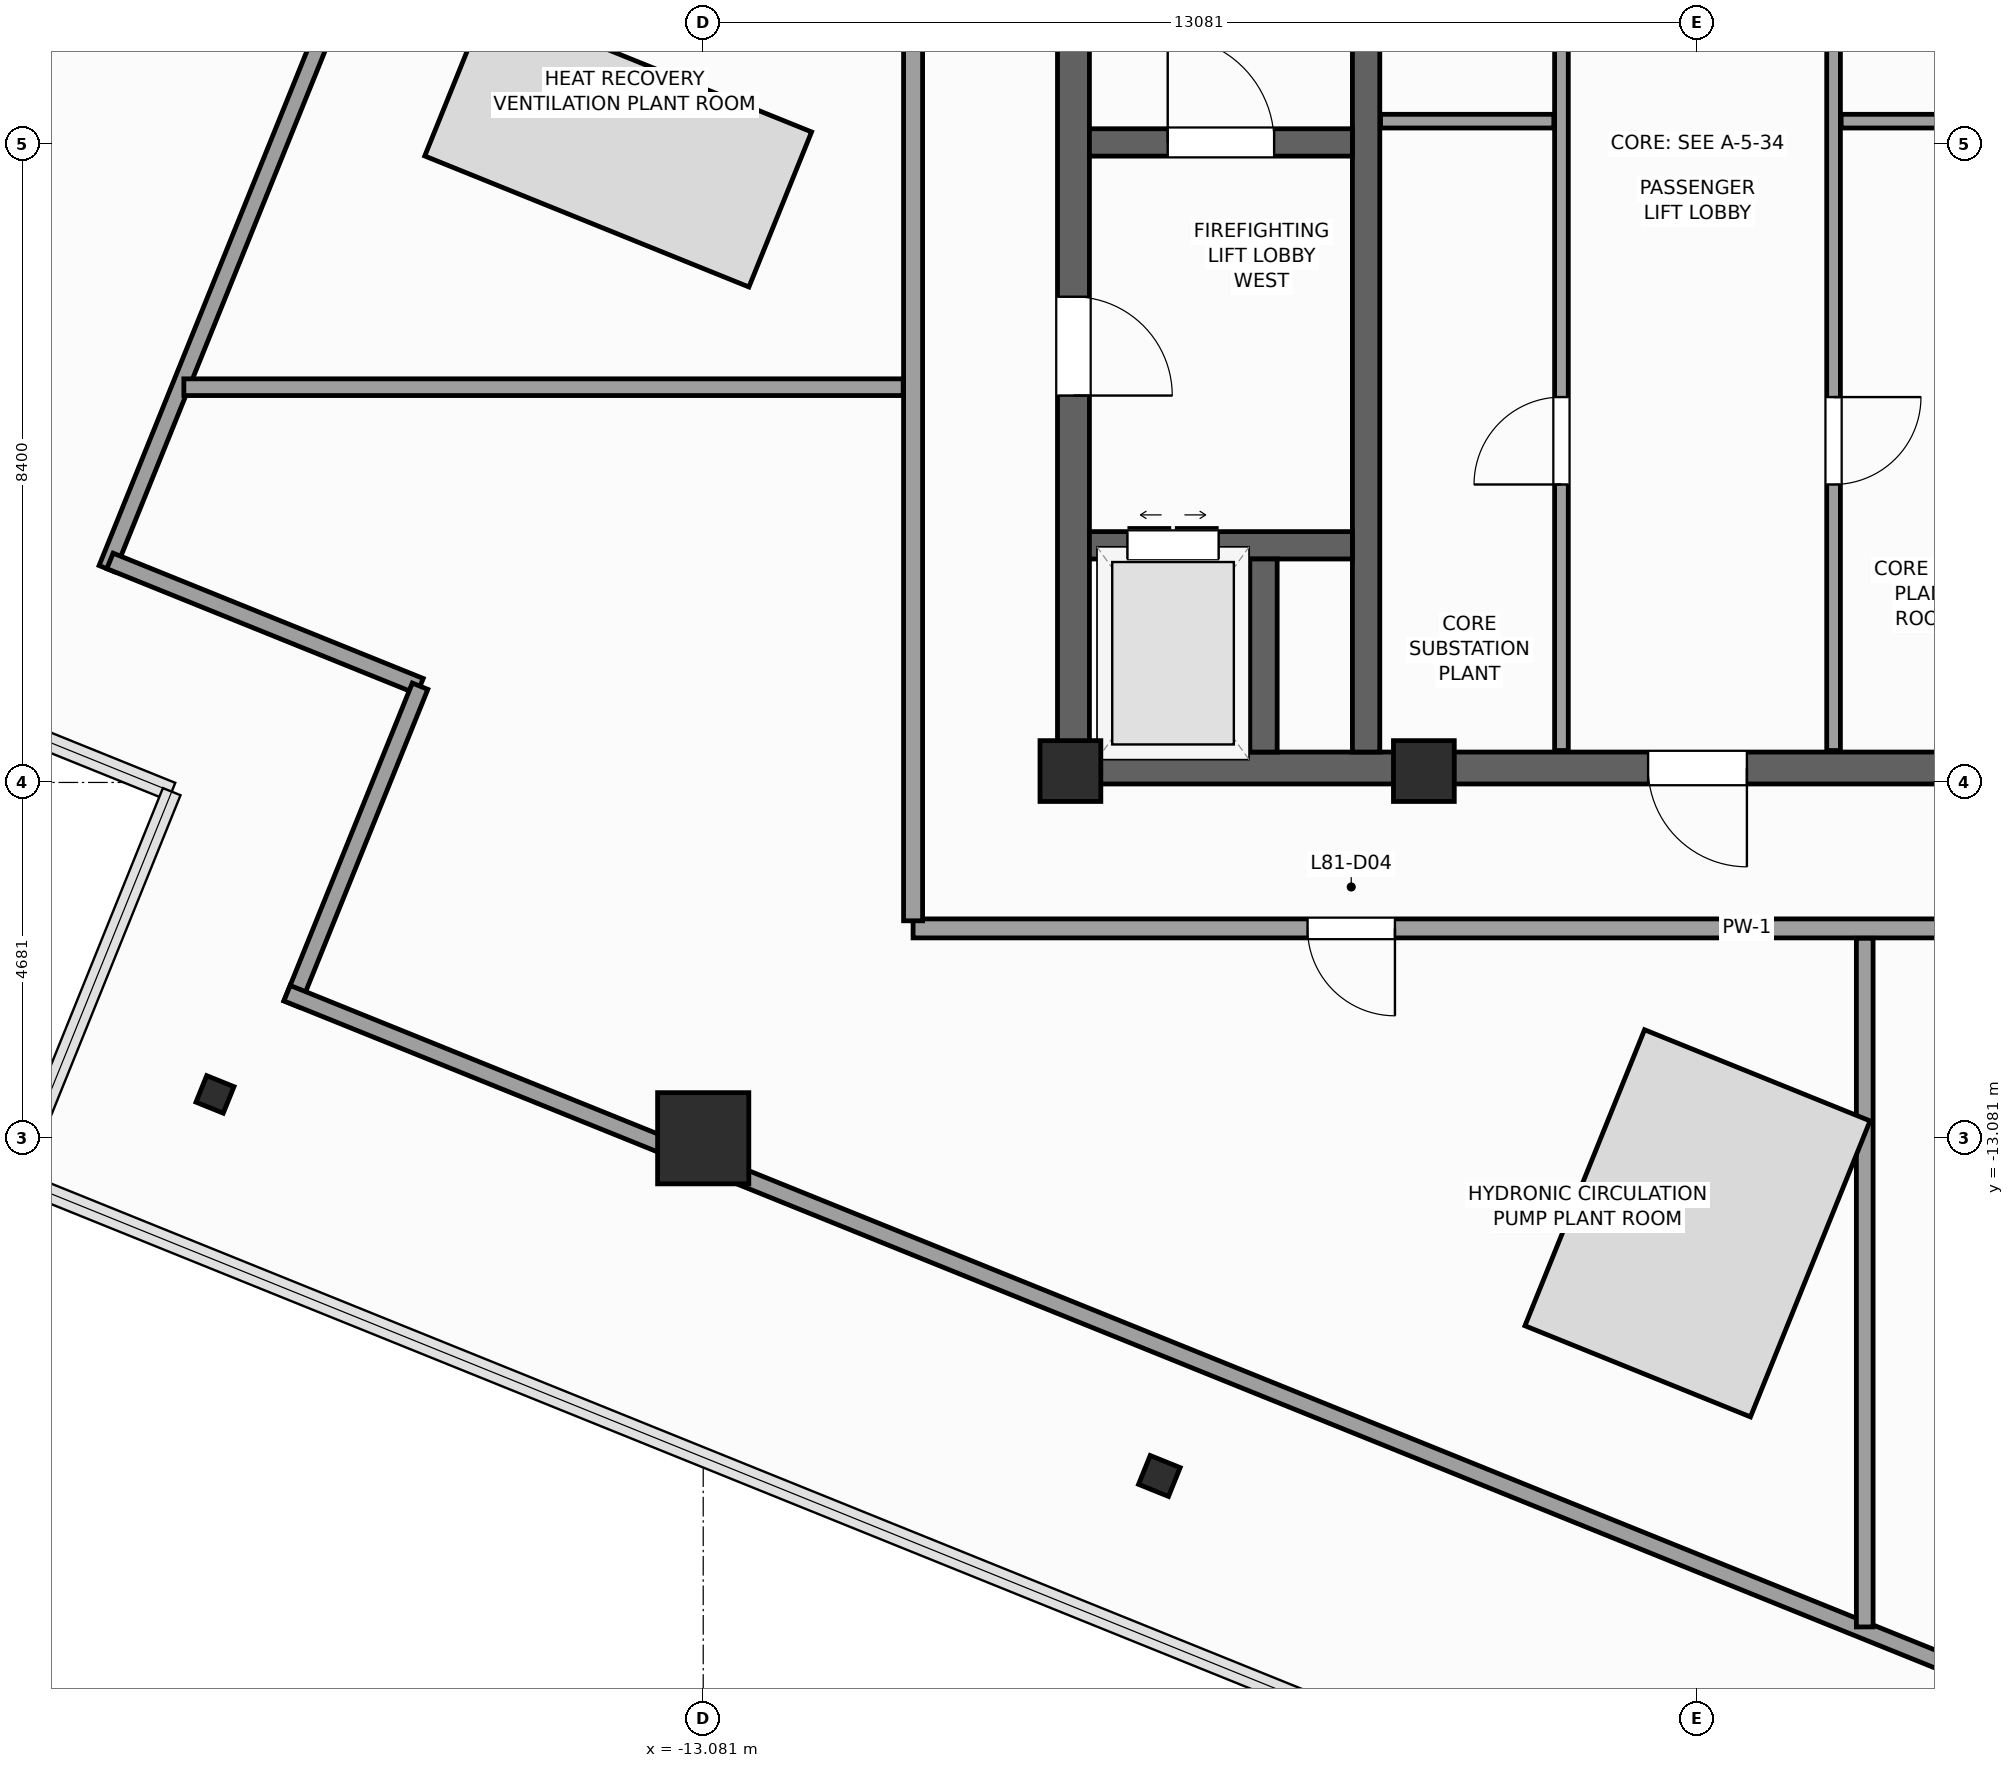
"""IFC4 building model, lengths in metres.
Left out: names, types, materials, properties, quantities, classifications, styles, units other than length and angle.
Written with IfcOpenShell. Run it as: python <this file> out.ifc"""

import sys

from ifc_helpers import new_model, si_unit, direction, frame, frame_2d, origin, origin_2d, place, context, subcontext, project, spatial, rectangle, i_section, extrude, source, transform, mapped, element, fill, save


model = new_model("IFC4")
c1 = context("Model", 3, precision=1e-05, world=origin(), true_north=direction((0.0, 1.0)))
c2 = subcontext(c1, "Body", "Model", "MODEL_VIEW")
j1 = project(units=[si_unit("LENGTHUNIT", "METRE"), si_unit("PLANEANGLEUNIT", "RADIAN")], contexts=[c1])
p1 = place(None, origin())
s1 = spatial("IfcSite", under=j1, at=p1, CompositionType="ELEMENT")
p2 = place(p1, origin())
s2 = spatial("IfcBuilding", under=s1, at=p2, CompositionType="ELEMENT")
p3 = place(p2, frame((0.0, 0.0, 329.6)))
s3 = spatial("IfcBuildingStorey", under=s2, at=p3, CompositionType="ELEMENT", Elevation=329.6)
p4 = place(p3, frame((-8.42, -8.21, 0.0), z_axis=(0.0, 0.0, 1.0), x_axis=(1.0, 0.0, 0.0)))
e1 = element("IfcWall", 1, at=p4, inside=s3, PredefinedType="SHEAR", context=c2, shape_type="SweptSolid", body=[
    extrude(rectangle(XDim=16.84, YDim=0.42, at=frame_2d((8.42, 0.0))), origin(), (0.0, 0.0, 1.0), 4.0),
])
p5 = place(p4, frame((7.77, 0.0, 0.0)))
e2 = element("IfcOpeningElement", 2, at=p5, cuts=e1, PredefinedType="OPENING", context=c2, shape_type="SweptSolid", body=[
    extrude(rectangle(XDim=1.3, YDim=2.2, at=frame_2d((0.65, 1.1))), frame((0.0, 0.22, 0.0), z_axis=(0.0, -1.0, 0.0), x_axis=(1.0, 0.0, 0.0)), (0.0, 0.0, 1.0), 0.44),
])
p6 = place(p3, frame((-8.21, -8.0, 0.0), z_axis=(0.0, 0.0, 1.0), x_axis=(0.0, 1.0, 0.0)))
e3 = element("IfcWall", 3, at=p6, inside=s3, PredefinedType="SHEAR", context=c2, shape_type="SweptSolid", body=[
    extrude(rectangle(XDim=16.0, YDim=0.42, at=frame_2d((8.0, 0.0))), origin(), (0.0, 0.0, 1.0), 4.0),
])
p7 = place(p6, frame((4.69, 0.0, 0.0)))
e4 = element("IfcOpeningElement", 4, at=p7, cuts=e3, PredefinedType="OPENING", context=c2, shape_type="SweptSolid", body=[
    extrude(rectangle(XDim=1.3, YDim=2.2, at=frame_2d((0.65, 1.1))), frame((0.0, 0.22, 0.0), z_axis=(0.0, -1.0, 0.0), x_axis=(1.0, 0.0, 0.0)), (0.0, 0.0, 1.0), 0.44),
])
p8 = place(p3, frame((-4.36, -8.0, 0.0), z_axis=(0.0, 0.0, 1.0), x_axis=(0.0, 1.0, 0.0)))
e5 = element("IfcWall", 5, at=p8, inside=s3, PredefinedType="SHEAR", context=c2, shape_type="SweptSolid", body=[
    extrude(rectangle(XDim=16.0, YDim=0.36, at=frame_2d((8.0, 0.0))), origin(), (0.0, 0.0, 1.0), 4.0),
])
p9 = place(p3, frame((-8.0, 0.02, 0.0), z_axis=(0.0, 0.0, 1.0), x_axis=(1.0, 0.0, 0.0)))
e6 = element("IfcWall", 6, at=p9, inside=s3, PredefinedType="SHEAR", context=c2, shape_type="SweptSolid", body=[
    extrude(rectangle(XDim=3.46, YDim=0.36, at=frame_2d((1.73, 0.0))), origin(), (0.0, 0.0, 1.0), 4.0),
])
p10 = place(p9, frame((1.03, 0.0, 0.0)))
e7 = element("IfcOpeningElement", 7, at=p10, cuts=e6, PredefinedType="OPENING", context=c2, shape_type="SweptSolid", body=[
    extrude(rectangle(XDim=1.4, YDim=2.2, at=frame_2d((0.7, 1.1))), frame((0.0, 0.19, 0.0), z_axis=(0.0, -1.0, 0.0), x_axis=(1.0, 0.0, 0.0)), (0.0, 0.0, 1.0), 0.38),
])
p11 = place(p3, frame((-8.0, -5.28, 0.0), z_axis=(0.0, 0.0, 1.0), x_axis=(1.0, 0.0, 0.0)))
e8 = element("IfcWall", 8, at=p11, inside=s3, PredefinedType="SHEAR", context=c2, shape_type="SweptSolid", body=[
    extrude(rectangle(XDim=3.46, YDim=0.36, at=frame_2d((1.73, 0.0))), origin(), (0.0, 0.0, 1.0), 4.0),
])
p12 = place(p11, frame((0.5, 0.0, 0.0)))
e9 = element("IfcOpeningElement", 9, at=p12, cuts=e8, PredefinedType="OPENING", context=c2, shape_type="SweptSolid", body=[
    extrude(rectangle(XDim=1.2, YDim=2.25, at=frame_2d((0.6, 1.125))), frame((0.0, 0.19, 0.0), z_axis=(0.0, -1.0, 0.0), x_axis=(1.0, 0.0, 0.0)), (0.0, 0.0, 1.0), 0.38),
])
p13 = place(p3, frame((-5.71, -8.0, 0.0), z_axis=(0.0, 0.0, 1.0), x_axis=(0.0, 1.0, 0.0)))
e10 = element("IfcWall", 10, at=p13, inside=s3, PredefinedType="SHEAR", context=c2, shape_type="SweptSolid", body=[
    extrude(rectangle(XDim=2.54, YDim=0.36, at=frame_2d((1.27, 0.0))), origin(), (0.0, 0.0, 1.0), 4.0),
])
m1 = source(origin(), c2, "Body", "SweptSolid", [
    extrude(rectangle(XDim=0.8, YDim=0.8, at=origin_2d()), origin(), (0.0, 0.0, 1.0), 4.0),
])
for number, where, z_axis, x_axis in (
    (11, (-8.25, -8.25, 0.0), (0.0, 0.0, 1.0), (1.0, 0.0, 0.0)),
    (12, (-3.6, -8.25, 0.0), (0.0, 0.0, 1.0), (1.0, 0.0, 0.0)),
):
    element("IfcColumn", number, at=place(p3, frame(where, z_axis=z_axis, x_axis=x_axis)), inside=s3, PredefinedType="PILASTER", context=c2, shape_type="MappedRepresentation", body=[
        mapped(m1, transform((0.0, 0.0, 0.0), scale=1.0)),
    ])
m2 = source(origin(), c2, "Body", "SweptSolid", [
    extrude(rectangle(XDim=1.2, YDim=1.2, at=origin_2d()), origin(), (0.0, 0.0, 1.0), 4.0),
])
p14 = place(p3, frame((-13.081, -13.081, 0.0), z_axis=(0.0, 0.0, 1.0), x_axis=(1.0, 0.0, 0.0)))
e13 = element("IfcColumn", 13, at=p14, inside=s3, PredefinedType="COLUMN", context=c2, shape_type="MappedRepresentation", body=[
    mapped(m2, transform((0.0, 0.0, 0.0), scale=1.0)),
])
m3 = source(origin(), c2, "Body", "SweptSolid", [
    extrude(i_section(OverallWidth=0.376, OverallDepth=0.387, WebThickness=0.02, FlangeThickness=0.032, FilletRadius=0.015, at=origin_2d()), origin(), (0.0, 0.0, 1.0), 4.0),
])
p15 = place(p3, frame((-19.504, -12.504, 0.0), z_axis=(0.0, 0.0, 1.0), x_axis=(0.374606593416, 0.927183854567, 0.0)))
e14 = element("IfcColumn", 14, at=p15, inside=s3, PredefinedType="COLUMN", context=c2, shape_type="MappedRepresentation", body=[
    mapped(m3, transform((0.0, 0.0, 0.0), scale=1.0)),
])
m4 = source(origin(), c2, "Body", "SweptSolid", [
    extrude(i_section(OverallWidth=0.409, OverallDepth=0.425, WebThickness=0.024, FlangeThickness=0.039, FilletRadius=0.015, at=origin_2d()), origin(), (0.0, 0.0, 1.0), 4.0),
])
p16 = place(p3, frame((-7.08, -17.524, 0.0), z_axis=(0.0, 0.0, 1.0), x_axis=(0.374606593416, 0.927183854567, 0.0)))
e15 = element("IfcColumn", 15, at=p16, inside=s3, PredefinedType="COLUMN", context=c2, shape_type="MappedRepresentation", body=[
    mapped(m4, transform((0.0, 0.0, 0.0), scale=1.0)),
])
p17 = place(p3, frame((-1.79, -7.98, 0.0), z_axis=(0.0, 0.0, 1.0), x_axis=(0.0, 1.0, 0.0)))
e16 = element("IfcWall", 16, at=p17, inside=s3, PredefinedType="PARTITIONING", context=c2, shape_type="SweptSolid", body=[
    extrude(rectangle(XDim=12.38, YDim=0.18, at=frame_2d((6.19, 0.0))), origin(), (0.0, 0.0, 1.0), 3.7),
])
p18 = place(p17, frame((3.5, 0.0, 0.0)))
e17 = element("IfcOpeningElement", 17, at=p18, cuts=e16, PredefinedType="OPENING", context=c2, shape_type="SweptSolid", body=[
    extrude(rectangle(XDim=1.15, YDim=2.25, at=frame_2d((0.575, 1.125))), frame((0.0, 0.1, 0.0), z_axis=(0.0, -1.0, 0.0), x_axis=(1.0, 0.0, 0.0)), (0.0, 0.0, 1.0), 0.2),
])
p19 = place(p17, frame((9.8, 0.0, 0.0)))
e18 = element("IfcOpeningElement", 18, at=p19, cuts=e16, PredefinedType="OPENING", context=c2, shape_type="SweptSolid", body=[
    extrude(rectangle(XDim=1.15, YDim=2.25, at=frame_2d((0.575, 1.125))), frame((0.0, 0.1, 0.0), z_axis=(0.0, -1.0, 0.0), x_axis=(1.0, 0.0, 0.0)), (0.0, 0.0, 1.0), 0.2),
])
p20 = place(p3, frame((1.79, -7.98, 0.0), z_axis=(0.0, 0.0, 1.0), x_axis=(0.0, 1.0, 0.0)))
e19 = element("IfcWall", 19, at=p20, inside=s3, PredefinedType="PARTITIONING", context=c2, shape_type="SweptSolid", body=[
    extrude(rectangle(XDim=12.38, YDim=0.18, at=frame_2d((6.19, 0.0))), origin(), (0.0, 0.0, 1.0), 3.7),
])
p21 = place(p20, frame((3.5, 0.0, 0.0)))
e20 = element("IfcOpeningElement", 20, at=p21, cuts=e19, PredefinedType="OPENING", context=c2, shape_type="SweptSolid", body=[
    extrude(rectangle(XDim=1.15, YDim=2.25, at=frame_2d((0.575, 1.125))), frame((0.0, 0.1, 0.0), z_axis=(0.0, -1.0, 0.0), x_axis=(1.0, 0.0, 0.0)), (0.0, 0.0, 1.0), 0.2),
])
p22 = place(p20, frame((9.8, 0.0, 0.0)))
e21 = element("IfcOpeningElement", 21, at=p22, cuts=e19, PredefinedType="OPENING", context=c2, shape_type="SweptSolid", body=[
    extrude(rectangle(XDim=1.15, YDim=2.25, at=frame_2d((0.575, 1.125))), frame((0.0, 0.1, 0.0), z_axis=(0.0, -1.0, 0.0), x_axis=(1.0, 0.0, 0.0)), (0.0, 0.0, 1.0), 0.2),
])
for number, where, z_axis, x_axis in (
    (22, (-4.17, 0.3, 0.0), (0.0, 0.0, 1.0), (1.0, 0.0, 0.0)),
    (23, (1.89, 0.3, 0.0), (0.0, 0.0, 1.0), (1.0, 0.0, 0.0)),
):
    element("IfcWall", number, at=place(p3, frame(where, z_axis=z_axis, x_axis=x_axis)), inside=s3, PredefinedType="PARTITIONING", context=c2, shape_type="SweptSolid", body=[
        extrude(rectangle(XDim=2.28, YDim=0.18, at=frame_2d((1.14, 0.0))), origin(), (0.0, 0.0, 1.0), 3.7),
    ])
p23 = place(p3, frame((-11.172, 18.556, 0.0), z_axis=(0.0, 0.0, 1.0), x_axis=(-0.374611707018, -0.927181788521, 0.0)))
e24 = element("IfcWall", 24, at=p23, inside=s3, PredefinedType="PARTITIONING", context=c2, shape_type="SweptSolid", body=[
    extrude(rectangle(XDim=26.04, YDim=0.22, at=frame_2d((13.02, 0.0))), origin(), (0.0, 0.0, 1.0), 3.05),
])
p24 = place(p3, frame((-20.886, -5.486, 0.0), z_axis=(0.0, 0.0, 1.0), x_axis=(0.927189216671, -0.374593321469, 0.0)))
e25 = element("IfcWall", 25, at=p24, inside=s3, PredefinedType="PARTITIONING", context=c2, shape_type="SweptSolid", body=[
    extrude(rectangle(XDim=4.4, YDim=0.22, at=frame_2d((2.2, 0.0))), origin(), (0.0, 0.0, 1.0), 3.7),
])
p25 = place(p3, frame((-16.806, -7.134, 0.0), z_axis=(0.0, 0.0, 1.0), x_axis=(-0.374599091925, -0.927186885331, 0.0)))
e26 = element("IfcWall", 26, at=p25, inside=s3, PredefinedType="PARTITIONING", context=c2, shape_type="SweptSolid", body=[
    extrude(rectangle(XDim=4.51, YDim=0.22, at=frame_2d((2.255, 0.0))), origin(), (0.0, 0.0, 1.0), 3.7),
])
p26 = place(p3, frame((-18.556, -11.172, 0.0), z_axis=(0.0, 0.0, 1.0), x_axis=(0.927181788521, -0.374611707018, 0.0)))
e27 = element("IfcWall", 27, at=p26, inside=s3, PredefinedType="PARTITIONING", context=c2, shape_type="SweptSolid", body=[
    extrude(rectangle(XDim=26.04, YDim=0.22, at=frame_2d((13.02, 0.0))), origin(), (0.0, 0.0, 1.0), 3.05),
])
p27 = place(p3, frame((-10.32, -10.32, 0.0), z_axis=(0.0, 0.0, 1.0), x_axis=(1.0, 0.0, 0.0)))
e28 = element("IfcWall", 28, at=p27, inside=s3, PredefinedType="PARTITIONING", context=c2, shape_type="SweptSolid", body=[
    extrude(rectangle(XDim=21.94, YDim=0.25, at=frame_2d((10.97, 0.0))), origin(), (0.0, 0.0, 1.0), 3.7),
])
p28 = place(p27, frame((16.49, 0.0, 0.0)))
e29 = element("IfcOpeningElement", 29, at=p28, cuts=e28, PredefinedType="OPENING", context=c2, shape_type="SweptSolid", body=[
    extrude(rectangle(XDim=1.15, YDim=2.25, at=frame_2d((0.575, 1.125))), frame((0.0, 0.135, 0.0), z_axis=(0.0, -1.0, 0.0), x_axis=(1.0, 0.0, 0.0)), (0.0, 0.0, 1.0), 0.27),
])
p29 = place(p27, frame((5.189, 0.0, 0.0)))
e30 = element("IfcOpeningElement", 30, at=p29, cuts=e28, PredefinedType="OPENING", context=c2, shape_type="SweptSolid", body=[
    extrude(rectangle(XDim=1.15, YDim=2.25, at=frame_2d((0.575, 1.125))), frame((0.0, 0.135, 0.0), z_axis=(0.0, -1.0, 0.0), x_axis=(1.0, 0.0, 0.0)), (0.0, 0.0, 1.0), 0.27),
])
p30 = place(p3, frame((-10.32, -10.22, 0.0), z_axis=(0.0, 0.0, 1.0), x_axis=(0.0, 1.0, 0.0)))
e31 = element("IfcWall", 31, at=p30, inside=s3, PredefinedType="PARTITIONING", context=c2, shape_type="SweptSolid", body=[
    extrude(rectangle(XDim=21.74, YDim=0.25, at=frame_2d((10.87, 0.0))), origin(), (0.0, 0.0, 1.0), 3.7),
])
p31 = place(p30, frame((13.641, 0.0, 0.0)))
e32 = element("IfcOpeningElement", 32, at=p31, cuts=e31, PredefinedType="OPENING", context=c2, shape_type="SweptSolid", body=[
    extrude(rectangle(XDim=1.15, YDim=2.25, at=frame_2d((0.575, 1.125))), frame((0.0, 0.135, 0.0), z_axis=(0.0, -1.0, 0.0), x_axis=(1.0, 0.0, 0.0)), (0.0, 0.0, 1.0), 0.27),
])
p32 = place(p3, frame((2.2, -10.45, 0.0), z_axis=(0.0, 0.0, 1.0), x_axis=(0.0, -1.0, 0.0)))
e33 = element("IfcWall", 33, at=p32, inside=s3, PredefinedType="PARTITIONING", context=c2, shape_type="SweptSolid", body=[
    extrude(rectangle(XDim=9.06, YDim=0.22, at=frame_2d((4.53, 0.0))), origin(), (0.0, 0.0, 1.0), 3.7),
])
p33 = place(p3, frame((-10.45, -3.2, 0.0), z_axis=(0.0, 0.0, 1.0), x_axis=(-1.0, 0.0, 0.0)))
e34 = element("IfcWall", 34, at=p33, inside=s3, PredefinedType="PARTITIONING", context=c2, shape_type="SweptSolid", body=[
    extrude(rectangle(XDim=9.464, YDim=0.22, at=frame_2d((4.732, 0.0))), origin(), (0.0, 0.0, 1.0), 3.7),
])
m5 = source(origin(), c2, "Body", "SweptSolid", [
    extrude(rectangle(XDim=1.4, YDim=2.2, at=frame_2d((0.7, 1.1))), frame((0.0, 0.025, 0.0), z_axis=(0.0, -1.0, 0.0), x_axis=(1.0, 0.0, 0.0)), (0.0, 0.0, 1.0), 0.05),
])
p34 = place(p10, origin())
e35 = element("IfcDoor", 35, at=p34, inside=s3, OperationType="SINGLE_SWING_LEFT", PredefinedType="DOOR", context=c2, shape_type="MappedRepresentation", body=[
    mapped(m5, transform((0.0, 0.0, 0.0), scale=1.0)),
])
fill(e7, e35)
m6 = source(origin(), c2, "Body", "SweptSolid", [
    extrude(rectangle(XDim=1.3, YDim=2.2, at=frame_2d((0.65, 1.1))), frame((0.0, 0.025, 0.0), z_axis=(0.0, -1.0, 0.0), x_axis=(1.0, 0.0, 0.0)), (0.0, 0.0, 1.0), 0.05),
])
p35 = place(p7, frame((1.3, 0.0, 0.0), z_axis=(0.0, 0.0, 1.0), x_axis=(-1.0, 0.0, 0.0)))
e36 = element("IfcDoor", 36, at=p35, inside=s3, OperationType="SINGLE_SWING_LEFT", PredefinedType="DOOR", context=c2, shape_type="MappedRepresentation", body=[
    mapped(m6, transform((0.0, 0.0, 0.0), scale=1.0)),
])
fill(e4, e36)
p36 = place(p5, frame((1.3, 0.0, 0.0), z_axis=(0.0, 0.0, 1.0), x_axis=(-1.0, 0.0, 0.0)))
e37 = element("IfcDoor", 37, at=p36, inside=s3, OperationType="SINGLE_SWING_RIGHT", PredefinedType="DOOR", context=c2, shape_type="MappedRepresentation", body=[
    mapped(m6, transform((0.0, 0.0, 0.0), scale=1.0)),
])
fill(e2, e37)
m7 = source(origin(), c2, "Body", "SweptSolid", [
    extrude(rectangle(XDim=1.2, YDim=2.25, at=frame_2d((0.6, 1.125))), frame((0.0, 0.025, 0.0), z_axis=(0.0, -1.0, 0.0), x_axis=(1.0, 0.0, 0.0)), (0.0, 0.0, 1.0), 0.05),
])
p37 = place(p12, origin())
e38 = element("IfcDoor", 38, at=p37, inside=s3, OperationType="DOUBLE_DOOR_SLIDING", PredefinedType="DOOR", context=c2, shape_type="MappedRepresentation", body=[
    mapped(m7, transform((0.0, 0.0, 0.0), scale=1.0)),
])
fill(e9, e38)
m8 = source(origin(), c2, "Body", "SweptSolid", [
    extrude(rectangle(XDim=1.15, YDim=2.25, at=frame_2d((0.575, 1.125))), frame((0.0, 0.025, 0.0), z_axis=(0.0, -1.0, 0.0), x_axis=(1.0, 0.0, 0.0)), (0.0, 0.0, 1.0), 0.05),
])
p38 = place(p18, origin())
e39 = element("IfcDoor", 39, at=p38, inside=s3, OperationType="SINGLE_SWING_LEFT", PredefinedType="DOOR", context=c2, shape_type="MappedRepresentation", body=[
    mapped(m8, transform((0.0, 0.0, 0.0), scale=1.0)),
])
fill(e17, e39)
p39 = place(p21, frame((1.15, 0.0, 0.0), z_axis=(0.0, 0.0, 1.0), x_axis=(-1.0, 0.0, 0.0)))
e40 = element("IfcDoor", 40, at=p39, inside=s3, OperationType="SINGLE_SWING_RIGHT", PredefinedType="DOOR", context=c2, shape_type="MappedRepresentation", body=[
    mapped(m8, transform((0.0, 0.0, 0.0), scale=1.0)),
])
fill(e20, e40)
p40 = place(p29, frame((1.15, 0.0, 0.0), z_axis=(0.0, 0.0, 1.0), x_axis=(-1.0, 0.0, 0.0)))
e41 = element("IfcDoor", 41, at=p40, inside=s3, OperationType="SINGLE_SWING_RIGHT", PredefinedType="DOOR", context=c2, shape_type="MappedRepresentation", body=[
    mapped(m8, transform((0.0, 0.0, 0.0), scale=1.0)),
])
fill(e30, e41)
save(model, sys.argv[1])
